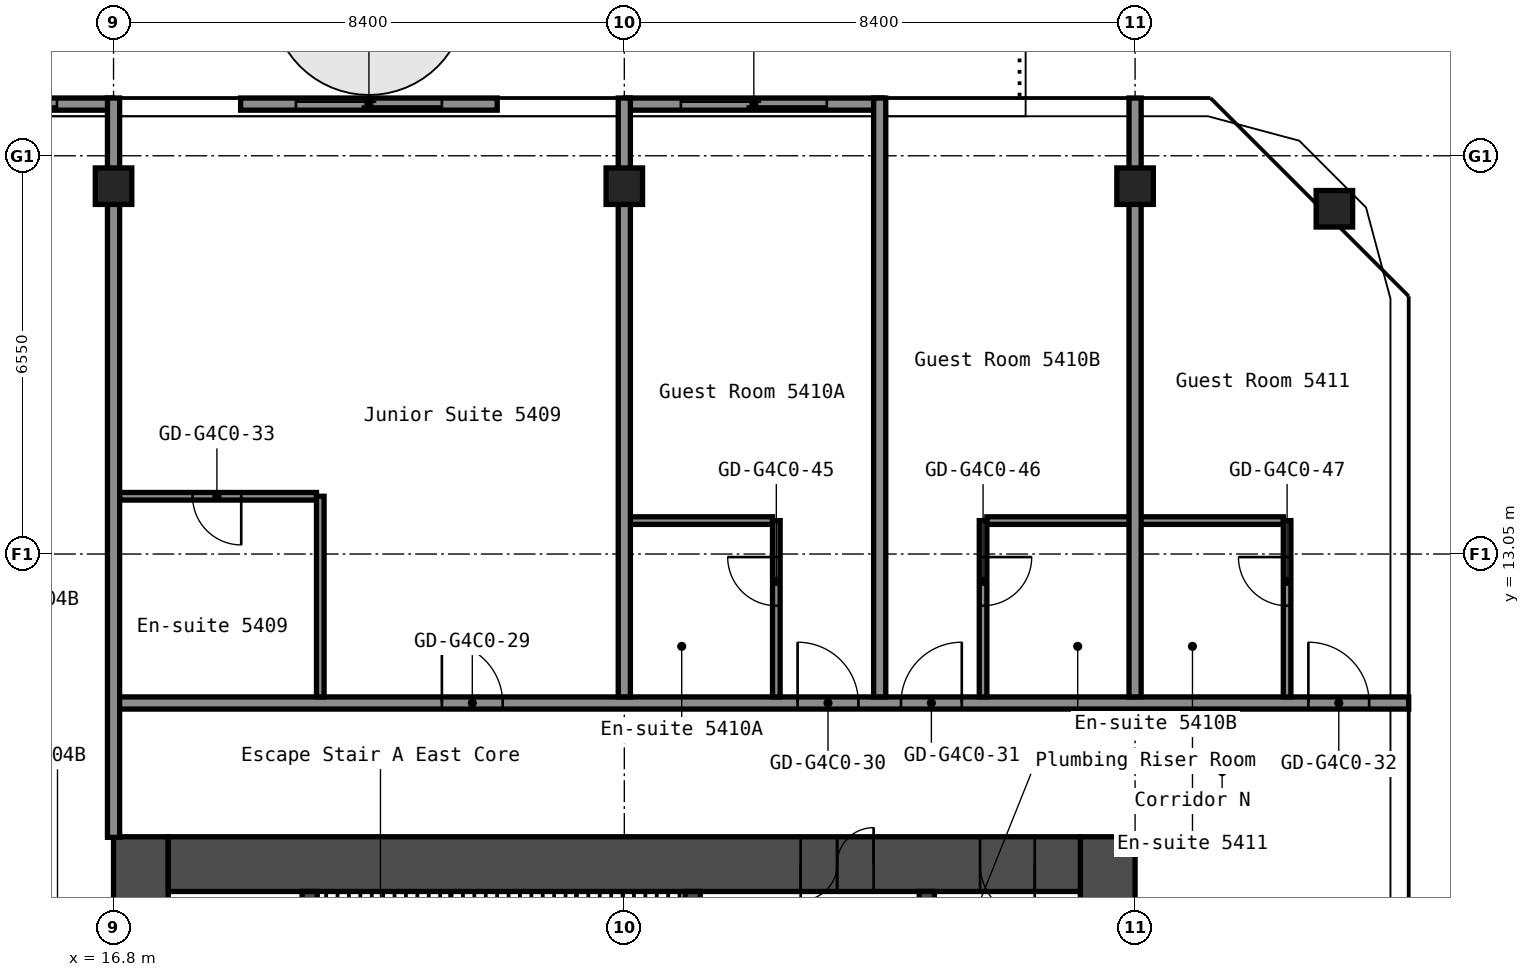
"""IFC4 building model, lengths in metres.
Left out: names, types, materials, properties, quantities, classifications, styles, units other than length and angle.
Written with IfcOpenShell. Run it as: python <this file> out.ifc"""

import sys

from ifc_helpers import new_model, si_unit, direction, frame, frame_2d, origin, origin_2d, place, context, subcontext, project, spatial, rectangle, hollow_rectangle, extrude, element, fill, save


model = new_model("IFC4")
c1 = context("Model", 3, precision=1e-05, world=origin(), true_north=direction((0.0, 1.0)))
c2 = subcontext(c1, "Body", "Model", "MODEL_VIEW")
j1 = project(units=[si_unit("LENGTHUNIT", "METRE"), si_unit("PLANEANGLEUNIT", "RADIAN")], contexts=[c1])
p1 = place(None, origin())
s1 = spatial("IfcSite", under=j1, at=p1, CompositionType="ELEMENT")
p2 = place(p1, origin())
s2 = spatial("IfcBuilding", under=s1, at=p2, CompositionType="ELEMENT")
p3 = place(p2, frame((0.0, 0.0, 193.0)))
s3 = spatial("IfcBuildingStorey", under=s2, at=p3, CompositionType="ELEMENT", Elevation=193.0)
for number, where, z_axis, x_axis in (
    (1, (16.8, 19.1, 0.0), (0.0, 0.0, 1.0), (1.0, 0.0, 0.0)),
    (2, (25.2, 19.1, 0.0), (0.0, 0.0, 1.0), (1.0, 0.0, 0.0)),
    (3, (33.6, 19.1, 0.0), (0.0, 0.0, 1.0), (1.0, 0.0, 0.0)),
    (4, (36.878, 18.729, 0.0), (0.0, 0.0, 1.0), (1.0, 0.0, 0.0)),
):
    element("IfcColumn", number, at=place(p3, frame(where, z_axis=z_axis, x_axis=x_axis)), inside=s3, PredefinedType="COLUMN", context=c2, shape_type="SweptSolid", body=[
        extrude(hollow_rectangle(XDim=0.6, YDim=0.6, WallThickness=0.025, InnerFilletRadius=0.038, OuterFilletRadius=0.062, at=origin_2d()), origin(), (0.0, 0.0, 1.0), 2.75),
    ])
p4 = place(p3, frame((17.25, -8.4, 0.0), z_axis=(0.0, 0.0, 1.0), x_axis=(0.0, 1.0, 0.0)))
e5 = element("IfcWall", 5, at=p4, inside=s3, PredefinedType="SHEAR", context=c2, shape_type="SweptSolid", body=[
    extrude(rectangle(XDim=16.8, YDim=0.9, at=frame_2d((8.4, 0.0))), origin(), (0.0, 0.0, 1.0), 2.75),
])
p5 = place(p4, frame((10.1, 0.0, 0.0)))
e6 = element("IfcOpeningElement", 6, at=p5, cuts=e5, PredefinedType="OPENING", context=c2, shape_type="SweptSolid", body=[
    extrude(rectangle(XDim=1.6, YDim=2.1, at=frame_2d((0.8, 1.05))), frame((0.0, 0.46, 0.0), z_axis=(0.0, -1.0, 0.0), x_axis=(1.0, 0.0, 0.0)), (0.0, 0.0, 1.0), 0.92),
])
p6 = place(p3, frame((33.15, -8.4, 0.0), z_axis=(0.0, 0.0, 1.0), x_axis=(0.0, 1.0, 0.0)))
e7 = element("IfcWall", 7, at=p6, inside=s3, PredefinedType="SHEAR", context=c2, shape_type="SweptSolid", body=[
    extrude(rectangle(XDim=16.8, YDim=0.9, at=frame_2d((8.4, 0.0))), origin(), (0.0, 0.0, 1.0), 2.75),
])
p7 = place(p3, frame((17.7, 7.95, 0.0), z_axis=(0.0, 0.0, 1.0), x_axis=(1.0, 0.0, 0.0)))
e8 = element("IfcWall", 8, at=p7, inside=s3, PredefinedType="SHEAR", context=c2, shape_type="SweptSolid", body=[
    extrude(rectangle(XDim=15.0, YDim=0.9, at=frame_2d((7.5, 0.0))), origin(), (0.0, 0.0, 1.0), 2.75),
])
p8 = place(p7, frame((10.4, 0.0, 0.0)))
e9 = element("IfcOpeningElement", 9, at=p8, cuts=e8, PredefinedType="OPENING", context=c2, shape_type="SweptSolid", body=[
    extrude(rectangle(XDim=1.2, YDim=2.1, at=frame_2d((0.6, 1.05))), frame((0.0, 0.46, 0.0), z_axis=(0.0, -1.0, 0.0), x_axis=(1.0, 0.0, 0.0)), (0.0, 0.0, 1.0), 0.92),
])
p9 = place(p7, frame((13.35, 0.0, 0.0)))
e10 = element("IfcOpeningElement", 10, at=p9, cuts=e8, PredefinedType="OPENING", context=c2, shape_type="SweptSolid", body=[
    extrude(rectangle(XDim=0.9, YDim=2.1, at=frame_2d((0.45, 1.05))), frame((0.0, 0.46, 0.0), z_axis=(0.0, -1.0, 0.0), x_axis=(1.0, 0.0, 0.0)), (0.0, 0.0, 1.0), 0.92),
])
p10 = place(p3, frame((20.025, 1.2, 0.0), z_axis=(0.0, 0.0, 1.0), x_axis=(0.0, 1.0, 0.0)))
e11 = element("IfcWall", 11, at=p10, inside=s3, PredefinedType="SHEAR", context=c2, shape_type="SweptSolid", body=[
    extrude(rectangle(XDim=6.3, YDim=0.25, at=frame_2d((3.15, 0.0))), origin(), (0.0, 0.0, 1.0), 2.75),
])
p11 = place(p3, frame((26.325, 3.75, 0.0), z_axis=(0.0, 0.0, 1.0), x_axis=(0.0, 1.0, 0.0)))
e12 = element("IfcWall", 12, at=p11, inside=s3, PredefinedType="SHEAR", context=c2, shape_type="SweptSolid", body=[
    extrude(rectangle(XDim=3.75, YDim=0.25, at=frame_2d((1.875, 0.0))), origin(), (0.0, 0.0, 1.0), 2.75),
])
p12 = place(p11, frame((1.25, 0.0, 0.0)))
e13 = element("IfcOpeningElement", 13, at=p12, cuts=e12, PredefinedType="OPENING", context=c2, shape_type="SweptSolid", body=[
    extrude(rectangle(XDim=1.2, YDim=2.1, at=frame_2d((0.6, 1.05))), frame((0.0, 0.135, 0.0), z_axis=(0.0, -1.0, 0.0), x_axis=(1.0, 0.0, 0.0)), (0.0, 0.0, 1.0), 0.27),
])
p13 = place(p3, frame((30.175, 1.45, 0.0), z_axis=(0.0, 0.0, 1.0), x_axis=(0.0, 1.0, 0.0)))
e14 = element("IfcWall", 14, at=p13, inside=s3, PredefinedType="SHEAR", context=c2, shape_type="SweptSolid", body=[
    extrude(rectangle(XDim=6.05, YDim=0.25, at=frame_2d((3.025, 0.0))), origin(), (0.0, 0.0, 1.0), 2.75),
])
p14 = place(p13, frame((2.625, 0.0, 0.0)))
e15 = element("IfcOpeningElement", 15, at=p14, cuts=e14, PredefinedType="OPENING", context=c2, shape_type="SweptSolid", body=[
    extrude(rectangle(XDim=1.1, YDim=2.1, at=frame_2d((0.55, 1.05))), frame((0.0, 0.135, 0.0), z_axis=(0.0, -1.0, 0.0), x_axis=(1.0, 0.0, 0.0)), (0.0, 0.0, 1.0), 0.27),
])
p15 = place(p3, frame((16.8, 10.6, 0.0), z_axis=(0.0, 0.0, 1.0), x_axis=(1.0, 0.0, 0.0)))
e16 = element("IfcWall", 16, at=p15, inside=s3, PredefinedType="PARTITIONING", context=c2, shape_type="SweptSolid", body=[
    extrude(rectangle(XDim=21.3, YDim=0.2, at=frame_2d((10.65, 0.0))), origin(), (0.0, 0.0, 1.0), 2.75),
])
p16 = place(p15, frame((5.4, 0.0, 0.0)))
e17 = element("IfcOpeningElement", 17, at=p16, cuts=e16, PredefinedType="OPENING", context=c2, shape_type="SweptSolid", body=[
    extrude(rectangle(XDim=1.0, YDim=2.1, at=frame_2d((0.5, 1.05))), frame((0.0, 0.11, 0.0), z_axis=(0.0, -1.0, 0.0), x_axis=(1.0, 0.0, 0.0)), (0.0, 0.0, 1.0), 0.22),
])
p17 = place(p15, frame((11.25, 0.0, 0.0)))
e18 = element("IfcOpeningElement", 18, at=p17, cuts=e16, PredefinedType="OPENING", context=c2, shape_type="SweptSolid", body=[
    extrude(rectangle(XDim=1.0, YDim=2.1, at=frame_2d((0.5, 1.05))), frame((0.0, 0.11, 0.0), z_axis=(0.0, -1.0, 0.0), x_axis=(1.0, 0.0, 0.0)), (0.0, 0.0, 1.0), 0.22),
])
p18 = place(p15, frame((12.95, 0.0, 0.0)))
e19 = element("IfcOpeningElement", 19, at=p18, cuts=e16, PredefinedType="OPENING", context=c2, shape_type="SweptSolid", body=[
    extrude(rectangle(XDim=1.0, YDim=2.1, at=frame_2d((0.5, 1.05))), frame((0.0, 0.11, 0.0), z_axis=(0.0, -1.0, 0.0), x_axis=(1.0, 0.0, 0.0)), (0.0, 0.0, 1.0), 0.22),
])
p19 = place(p15, frame((19.65, 0.0, 0.0)))
e20 = element("IfcOpeningElement", 20, at=p19, cuts=e16, PredefinedType="OPENING", context=c2, shape_type="SweptSolid", body=[
    extrude(rectangle(XDim=1.0, YDim=2.1, at=frame_2d((0.5, 1.05))), frame((0.0, 0.11, 0.0), z_axis=(0.0, -1.0, 0.0), x_axis=(1.0, 0.0, 0.0)), (0.0, 0.0, 1.0), 0.22),
])
p20 = place(p3, frame((25.3, 13.6, 0.0), z_axis=(0.0, 0.0, 1.0), x_axis=(1.0, 0.0, 0.0)))
e21 = element("IfcWall", 21, at=p20, inside=s3, PredefinedType="PARTITIONING", context=c2, shape_type="SweptSolid", body=[
    extrude(rectangle(XDim=2.337, YDim=0.125, at=frame_2d((1.169, 0.0))), origin(), (0.0, 0.0, 1.0), 2.75),
])
p21 = place(p3, frame((31.163, 13.6, 0.0), z_axis=(0.0, 0.0, 1.0), x_axis=(1.0, 0.0, 0.0)))
e22 = element("IfcWall", 22, at=p21, inside=s3, PredefinedType="PARTITIONING", context=c2, shape_type="SweptSolid", body=[
    extrude(rectangle(XDim=4.875, YDim=0.125, at=frame_2d((2.438, 0.0))), origin(), (0.0, 0.0, 1.0), 2.75),
])
p22 = place(p3, frame((16.9, 14.0, 0.0), z_axis=(0.0, 0.0, 1.0), x_axis=(1.0, 0.0, 0.0)))
e23 = element("IfcWall", 23, at=p22, inside=s3, PredefinedType="PARTITIONING", context=c2, shape_type="SweptSolid", body=[
    extrude(rectangle(XDim=3.238, YDim=0.125, at=frame_2d((1.619, 0.0))), origin(), (0.0, 0.0, 1.0), 2.75),
])
p23 = place(p22, frame((1.2, 0.0, 0.0)))
e24 = element("IfcOpeningElement", 24, at=p23, cuts=e23, PredefinedType="OPENING", context=c2, shape_type="SweptSolid", body=[
    extrude(rectangle(XDim=0.8, YDim=2.1, at=frame_2d((0.4, 1.05))), frame((0.0, 0.073, 0.0), z_axis=(0.0, -1.0, 0.0), x_axis=(1.0, 0.0, 0.0)), (0.0, 0.0, 1.0), 0.145),
])
p24 = place(p3, frame((16.8, 8.39, 0.0), z_axis=(0.0, 0.0, 1.0), x_axis=(0.0, 1.0, 0.0)))
e25 = element("IfcWall", 25, at=p24, inside=s3, PredefinedType="PARTITIONING", context=c2, shape_type="SweptSolid", body=[
    extrude(rectangle(XDim=12.16, YDim=0.2, at=frame_2d((6.08, 0.0))), origin(), (0.0, 0.0, 1.0), 2.75),
])
p25 = place(p3, frame((20.2, 10.7, 0.0), z_axis=(0.0, 0.0, 1.0), x_axis=(0.0, 1.0, 0.0)))
e26 = element("IfcWall", 26, at=p25, inside=s3, PredefinedType="PARTITIONING", context=c2, shape_type="SweptSolid", body=[
    extrude(rectangle(XDim=3.3, YDim=0.125, at=frame_2d((1.65, 0.0))), origin(), (0.0, 0.0, 1.0), 2.75),
])
p26 = place(p3, frame((25.2, 10.7, 0.0), z_axis=(0.0, 0.0, 1.0), x_axis=(0.0, 1.0, 0.0)))
e27 = element("IfcWall", 27, at=p26, inside=s3, PredefinedType="PARTITIONING", context=c2, shape_type="SweptSolid", body=[
    extrude(rectangle(XDim=9.85, YDim=0.2, at=frame_2d((4.925, 0.0))), origin(), (0.0, 0.0, 1.0), 2.75),
])
p27 = place(p3, frame((27.7, 10.7, 0.0), z_axis=(0.0, 0.0, 1.0), x_axis=(0.0, 1.0, 0.0)))
e28 = element("IfcWall", 28, at=p27, inside=s3, PredefinedType="PARTITIONING", context=c2, shape_type="SweptSolid", body=[
    extrude(rectangle(XDim=2.9, YDim=0.125, at=frame_2d((1.45, 0.0))), origin(), (0.0, 0.0, 1.0), 2.75),
])
p28 = place(p27, frame((1.5, 0.0, 0.0)))
e29 = element("IfcOpeningElement", 29, at=p28, cuts=e28, PredefinedType="OPENING", context=c2, shape_type="SweptSolid", body=[
    extrude(rectangle(XDim=0.8, YDim=2.1, at=frame_2d((0.4, 1.05))), frame((0.0, 0.073, 0.0), z_axis=(0.0, -1.0, 0.0), x_axis=(1.0, 0.0, 0.0)), (0.0, 0.0, 1.0), 0.145),
])
p29 = place(p3, frame((29.4, 10.7, 0.0), z_axis=(0.0, 0.0, 1.0), x_axis=(0.0, 1.0, 0.0)))
e30 = element("IfcWall", 30, at=p29, inside=s3, PredefinedType="PARTITIONING", context=c2, shape_type="SweptSolid", body=[
    extrude(rectangle(XDim=9.85, YDim=0.2, at=frame_2d((4.925, 0.0))), origin(), (0.0, 0.0, 1.0), 2.75),
])
p30 = place(p3, frame((31.1, 10.7, 0.0), z_axis=(0.0, 0.0, 1.0), x_axis=(0.0, 1.0, 0.0)))
e31 = element("IfcWall", 31, at=p30, inside=s3, PredefinedType="PARTITIONING", context=c2, shape_type="SweptSolid", body=[
    extrude(rectangle(XDim=2.9, YDim=0.125, at=frame_2d((1.45, 0.0))), origin(), (0.0, 0.0, 1.0), 2.75),
])
p31 = place(p30, frame((1.5, 0.0, 0.0)))
e32 = element("IfcOpeningElement", 32, at=p31, cuts=e31, PredefinedType="OPENING", context=c2, shape_type="SweptSolid", body=[
    extrude(rectangle(XDim=0.8, YDim=2.1, at=frame_2d((0.4, 1.05))), frame((0.0, 0.073, 0.0), z_axis=(0.0, -1.0, 0.0), x_axis=(1.0, 0.0, 0.0)), (0.0, 0.0, 1.0), 0.145),
])
p32 = place(p3, frame((33.6, 10.7, 0.0), z_axis=(0.0, 0.0, 1.0), x_axis=(0.0, 1.0, 0.0)))
e33 = element("IfcWall", 33, at=p32, inside=s3, PredefinedType="PARTITIONING", context=c2, shape_type="SweptSolid", body=[
    extrude(rectangle(XDim=9.85, YDim=0.2, at=frame_2d((4.925, 0.0))), origin(), (0.0, 0.0, 1.0), 2.75),
])
p33 = place(p3, frame((36.1, 10.7, 0.0), z_axis=(0.0, 0.0, 1.0), x_axis=(0.0, 1.0, 0.0)))
e34 = element("IfcWall", 34, at=p33, inside=s3, PredefinedType="PARTITIONING", context=c2, shape_type="SweptSolid", body=[
    extrude(rectangle(XDim=2.9, YDim=0.125, at=frame_2d((1.45, 0.0))), origin(), (0.0, 0.0, 1.0), 2.75),
])
p34 = place(p33, frame((1.5, 0.0, 0.0)))
e35 = element("IfcOpeningElement", 35, at=p34, cuts=e34, PredefinedType="OPENING", context=c2, shape_type="SweptSolid", body=[
    extrude(rectangle(XDim=0.8, YDim=2.1, at=frame_2d((0.4, 1.05))), frame((0.0, 0.073, 0.0), z_axis=(0.0, -1.0, 0.0), x_axis=(1.0, 0.0, 0.0)), (0.0, 0.0, 1.0), 0.145),
])
p35 = place(p3, frame((29.44, 20.45, 0.0), z_axis=(0.0, 0.0, 1.0), x_axis=(-1.0, 0.0, 0.0)))
p36 = place(p35, frame((0.91, 0.0, 0.0)))
p37 = place(p36, frame((2.4, 0.0, 0.0), z_axis=(0.0, 0.0, 1.0), x_axis=(-1.0, 0.0, 0.0)))
e36 = element("IfcDoor", 36, at=p37, inside=s3, OperationType="SLIDING_TO_LEFT", PredefinedType="DOOR", context=c2, shape_type="SweptSolid", body=[
    extrude(rectangle(XDim=2.4, YDim=2.2, at=frame_2d((1.2, 1.1))), frame((0.0, 0.025, 0.0), z_axis=(0.0, -1.0, 0.0), x_axis=(1.0, 0.0, 0.0)), (0.0, 0.0, 1.0), 0.05),
])
p38 = place(p3, frame((23.11, 20.45, 0.0), z_axis=(0.0, 0.0, 1.0), x_axis=(-1.0, 0.0, 0.0)))
p39 = place(p38, frame((0.91, 0.0, 0.0)))
p40 = place(p39, frame((2.4, 0.0, 0.0), z_axis=(0.0, 0.0, 1.0), x_axis=(-1.0, 0.0, 0.0)))
e37 = element("IfcDoor", 37, at=p40, inside=s3, OperationType="SLIDING_TO_LEFT", PredefinedType="DOOR", context=c2, shape_type="SweptSolid", body=[
    extrude(rectangle(XDim=2.4, YDim=2.2, at=frame_2d((1.2, 1.1))), frame((0.0, 0.025, 0.0), z_axis=(0.0, -1.0, 0.0), x_axis=(1.0, 0.0, 0.0)), (0.0, 0.0, 1.0), 0.05),
])
p41 = place(p3, frame((16.78, 20.45, 0.0), z_axis=(0.0, 0.0, 1.0), x_axis=(-1.0, 0.0, 0.0)))
p42 = place(p41, frame((0.91, 0.0, 0.0)))
p43 = place(p42, frame((2.4, 0.0, 0.0), z_axis=(0.0, 0.0, 1.0), x_axis=(-1.0, 0.0, 0.0)))
e38 = element("IfcDoor", 38, at=p43, inside=s3, OperationType="SLIDING_TO_LEFT", PredefinedType="DOOR", context=c2, shape_type="SweptSolid", body=[
    extrude(rectangle(XDim=2.4, YDim=2.2, at=frame_2d((1.2, 1.1))), frame((0.0, 0.025, 0.0), z_axis=(0.0, -1.0, 0.0), x_axis=(1.0, 0.0, 0.0)), (0.0, 0.0, 1.0), 0.05),
])
p44 = place(p8, origin())
e39 = element("IfcDoor", 39, at=p44, inside=s3, OperationType="DOUBLE_DOOR_SINGLE_SWING", PredefinedType="DOOR", context=c2, shape_type="SweptSolid", body=[
    extrude(rectangle(XDim=1.2, YDim=2.1, at=frame_2d((0.6, 1.05))), frame((0.0, 0.025, 0.0), z_axis=(0.0, -1.0, 0.0), x_axis=(1.0, 0.0, 0.0)), (0.0, 0.0, 1.0), 0.05),
])
fill(e9, e39)
p45 = place(p9, origin())
e40 = element("IfcDoor", 40, at=p45, inside=s3, OperationType="SINGLE_SWING_RIGHT", PredefinedType="DOOR", context=c2, shape_type="SweptSolid", body=[
    extrude(rectangle(XDim=0.9, YDim=2.1, at=frame_2d((0.45, 1.05))), frame((0.0, 0.025, 0.0), z_axis=(0.0, -1.0, 0.0), x_axis=(1.0, 0.0, 0.0)), (0.0, 0.0, 1.0), 0.05),
])
fill(e10, e40)
p46 = place(p16, origin())
e41 = element("IfcDoor", 41, at=p46, inside=s3, OperationType="SINGLE_SWING_RIGHT", PredefinedType="DOOR", context=c2, shape_type="SweptSolid", body=[
    extrude(rectangle(XDim=1.0, YDim=2.1, at=frame_2d((0.5, 1.05))), frame((0.0, 0.025, 0.0), z_axis=(0.0, -1.0, 0.0), x_axis=(1.0, 0.0, 0.0)), (0.0, 0.0, 1.0), 0.05),
])
fill(e17, e41)
p47 = place(p17, origin())
e42 = element("IfcDoor", 42, at=p47, inside=s3, OperationType="SINGLE_SWING_RIGHT", PredefinedType="DOOR", context=c2, shape_type="SweptSolid", body=[
    extrude(rectangle(XDim=1.0, YDim=2.1, at=frame_2d((0.5, 1.05))), frame((0.0, 0.025, 0.0), z_axis=(0.0, -1.0, 0.0), x_axis=(1.0, 0.0, 0.0)), (0.0, 0.0, 1.0), 0.05),
])
fill(e18, e42)
p48 = place(p18, origin())
e43 = element("IfcDoor", 43, at=p48, inside=s3, OperationType="SINGLE_SWING_LEFT", PredefinedType="DOOR", context=c2, shape_type="SweptSolid", body=[
    extrude(rectangle(XDim=1.0, YDim=2.1, at=frame_2d((0.5, 1.05))), frame((0.0, 0.025, 0.0), z_axis=(0.0, -1.0, 0.0), x_axis=(1.0, 0.0, 0.0)), (0.0, 0.0, 1.0), 0.05),
])
fill(e19, e43)
p49 = place(p19, origin())
e44 = element("IfcDoor", 44, at=p49, inside=s3, OperationType="SINGLE_SWING_RIGHT", PredefinedType="DOOR", context=c2, shape_type="SweptSolid", body=[
    extrude(rectangle(XDim=1.0, YDim=2.1, at=frame_2d((0.5, 1.05))), frame((0.0, 0.025, 0.0), z_axis=(0.0, -1.0, 0.0), x_axis=(1.0, 0.0, 0.0)), (0.0, 0.0, 1.0), 0.05),
])
fill(e20, e44)
p50 = place(p23, origin())
e45 = element("IfcDoor", 45, at=p50, inside=s3, OperationType="SINGLE_SWING_RIGHT", PredefinedType="DOOR", context=c2, shape_type="SweptSolid", body=[
    extrude(rectangle(XDim=0.8, YDim=2.1, at=frame_2d((0.4, 1.05))), frame((0.0, 0.025, 0.0), z_axis=(0.0, -1.0, 0.0), x_axis=(1.0, 0.0, 0.0)), (0.0, 0.0, 1.0), 0.05),
])
fill(e24, e45)
p51 = place(p28, origin())
e46 = element("IfcDoor", 46, at=p51, inside=s3, OperationType="SINGLE_SWING_LEFT", PredefinedType="DOOR", context=c2, shape_type="SweptSolid", body=[
    extrude(rectangle(XDim=0.8, YDim=2.1, at=frame_2d((0.4, 1.05))), frame((0.0, 0.025, 0.0), z_axis=(0.0, -1.0, 0.0), x_axis=(1.0, 0.0, 0.0)), (0.0, 0.0, 1.0), 0.05),
])
fill(e29, e46)
p52 = place(p31, origin())
e47 = element("IfcDoor", 47, at=p52, inside=s3, OperationType="SINGLE_SWING_RIGHT", PredefinedType="DOOR", context=c2, shape_type="SweptSolid", body=[
    extrude(rectangle(XDim=0.8, YDim=2.1, at=frame_2d((0.4, 1.05))), frame((0.0, 0.025, 0.0), z_axis=(0.0, -1.0, 0.0), x_axis=(1.0, 0.0, 0.0)), (0.0, 0.0, 1.0), 0.05),
])
fill(e32, e47)
p53 = place(p34, origin())
e48 = element("IfcDoor", 48, at=p53, inside=s3, OperationType="SINGLE_SWING_LEFT", PredefinedType="DOOR", context=c2, shape_type="SweptSolid", body=[
    extrude(rectangle(XDim=0.8, YDim=2.1, at=frame_2d((0.4, 1.05))), frame((0.0, 0.025, 0.0), z_axis=(0.0, -1.0, 0.0), x_axis=(1.0, 0.0, 0.0)), (0.0, 0.0, 1.0), 0.05),
])
fill(e35, e48)
save(model, sys.argv[1])
